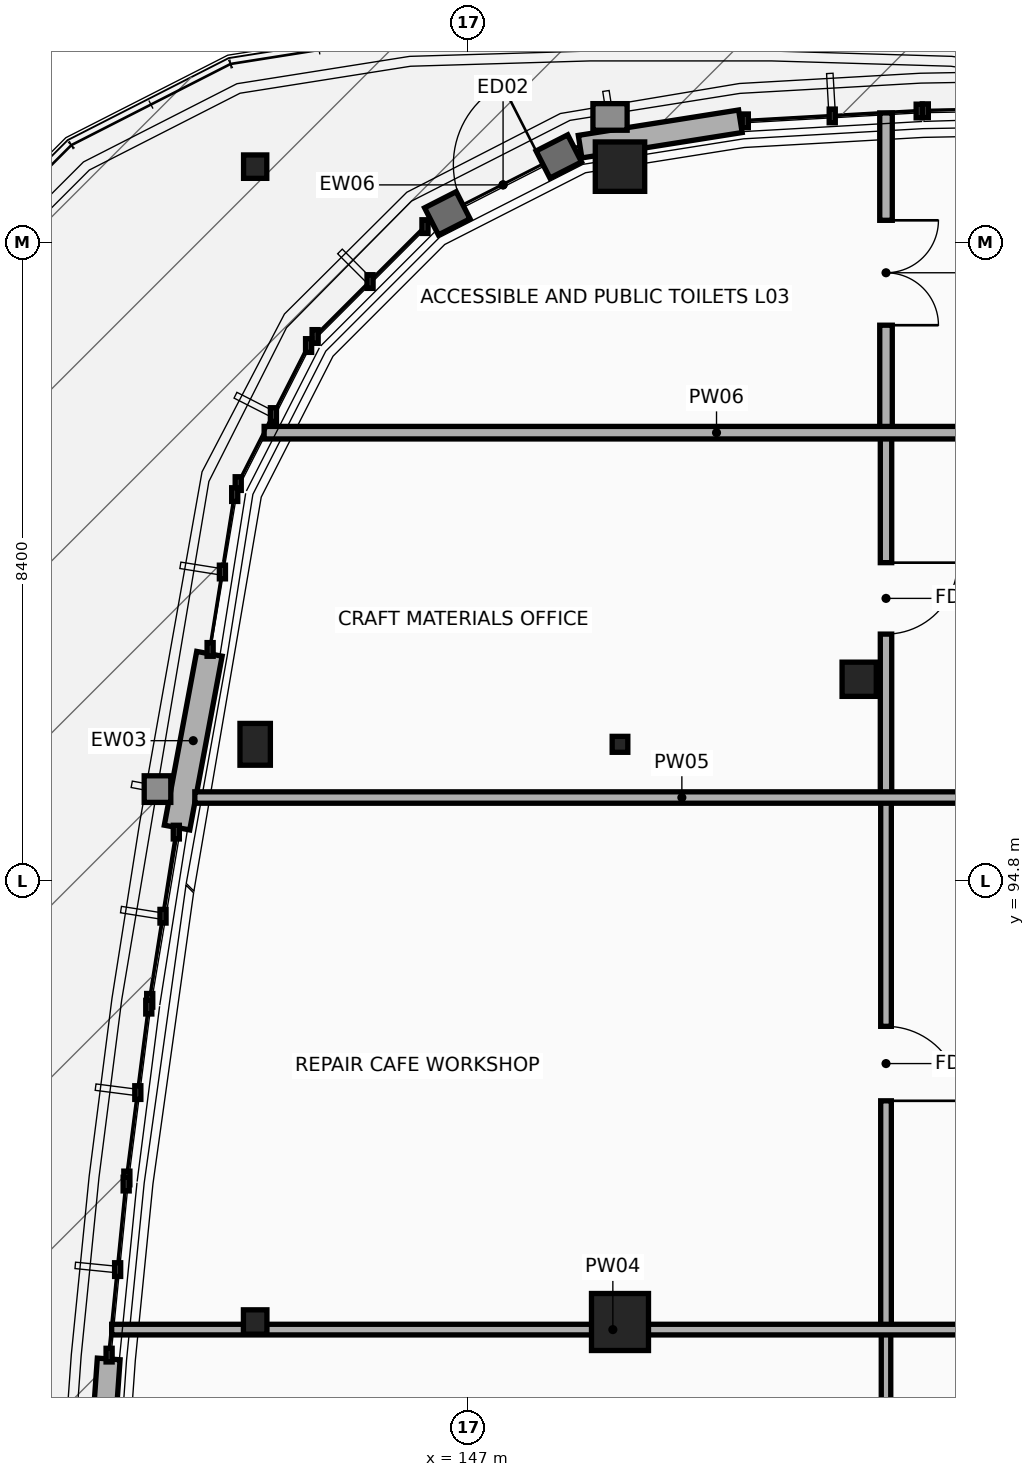
"""IFC4 building model, lengths in metres.
Left out: names, types, materials, properties, quantities, classifications, styles, units other than length and angle.
Written with IfcOpenShell. Run it as: python <this file> out.ifc"""

import sys

from ifc_helpers import new_model, si_unit, direction, frame, frame_2d, origin, origin_2d, place, context, subcontext, project, spatial, rectangle, i_section, extrude, element, fill, save


model = new_model("IFC4")
c1 = context("Model", 3, precision=1e-05, world=origin(), true_north=direction((0.0, 1.0)))
c2 = subcontext(c1, "Body", "Model", "MODEL_VIEW")
j1 = project(units=[si_unit("LENGTHUNIT", "METRE"), si_unit("PLANEANGLEUNIT", "RADIAN")], contexts=[c1])
p1 = place(None, origin())
s1 = spatial("IfcSite", under=j1, at=p1, CompositionType="ELEMENT")
p2 = place(p1, origin())
s2 = spatial("IfcBuilding", under=s1, at=p2, CompositionType="ELEMENT")
p3 = place(p2, frame((0.0, 0.0, 12.6)))
s3 = spatial("IfcBuildingStorey", under=s2, at=p3, CompositionType="ELEMENT", Elevation=12.6)
p4 = place(p3, frame((144.2, 89.0, 0.0), z_axis=(0.0, 0.0, 1.0), x_axis=(1.0, 0.0, 0.0)))
e1 = element("IfcColumn", 1, at=p4, inside=s3, PredefinedType="COLUMN", context=c2, shape_type="SweptSolid", body=[
    extrude(i_section(OverallWidth=0.309, OverallDepth=0.321, WebThickness=0.014, FlangeThickness=0.022, at=origin_2d()), origin(), (0.0, 0.0, 1.0), 3.6),
])
p5 = place(p3, frame((144.2, 96.6, 0.0), z_axis=(0.0, 0.0, 1.0), x_axis=(1.0, 0.0, 0.0)))
e2 = element("IfcColumn", 2, at=p5, inside=s3, PredefinedType="COLUMN", context=c2, shape_type="SweptSolid", body=[
    extrude(rectangle(XDim=0.4, YDim=0.55, at=origin_2d()), origin(), (0.0, 0.0, 1.0), 3.6),
])
p6 = place(p3, frame((144.2, 104.2, 0.0), z_axis=(0.0, 0.0, 1.0), x_axis=(1.0, 0.0, 0.0)))
e3 = element("IfcColumn", 3, at=p6, inside=s3, PredefinedType="COLUMN", context=c2, shape_type="SweptSolid", body=[
    extrude(i_section(OverallWidth=0.305, OverallDepth=0.308, WebThickness=0.01, FlangeThickness=0.015, at=origin_2d()), origin(), (0.0, 0.0, 1.0), 3.6),
])
p7 = place(p3, frame((149.0, 89.0, 0.0), z_axis=(0.0, 0.0, 1.0), x_axis=(1.0, 0.0, 0.0)))
e4 = element("IfcColumn", 4, at=p7, inside=s3, PredefinedType="COLUMN", context=c2, shape_type="SweptSolid", body=[
    extrude(rectangle(XDim=0.75, YDim=0.75, at=origin_2d()), origin(), (0.0, 0.0, 1.0), 3.6),
])
p8 = place(p3, frame((149.0, 96.6, 0.0), z_axis=(0.0, 0.0, 1.0), x_axis=(1.0, 0.0, 0.0)))
e5 = element("IfcColumn", 5, at=p8, inside=s3, PredefinedType="COLUMN", context=c2, shape_type="SweptSolid", body=[
    extrude(i_section(OverallWidth=0.206, OverallDepth=0.21, WebThickness=0.01, FlangeThickness=0.014, at=origin_2d()), origin(), (0.0, 0.0, 1.0), 3.6),
])
p9 = place(p3, frame((149.0, 104.2, 0.0), z_axis=(0.0, 0.0, 1.0), x_axis=(1.0, 0.0, 0.0)))
e6 = element("IfcColumn", 6, at=p9, inside=s3, PredefinedType="COLUMN", context=c2, shape_type="SweptSolid", body=[
    extrude(rectangle(XDim=0.65, YDim=0.65, at=origin_2d()), origin(), (0.0, 0.0, 1.0), 3.6),
])
p10 = place(p3, frame((152.147, 97.456, 0.0), z_axis=(0.0, 0.0, 1.0), x_axis=(1.0, 0.0, 0.0)))
e7 = element("IfcColumn", 7, at=p10, inside=s3, PredefinedType="COLUMN", context=c2, shape_type="SweptSolid", body=[
    extrude(rectangle(XDim=0.45, YDim=0.45, at=origin_2d()), origin(), (0.0, 0.0, 1.0), 3.6),
])
p11 = place(p3, frame((148.475, 104.463, 0.0), z_axis=(0.0, 0.0, 1.0), x_axis=(0.987672873908, 0.156532086638, 0.0)))
e8 = element("IfcWall", 8, at=p11, inside=s3, PredefinedType="STANDARD", context=c2, shape_type="SweptSolid", body=[
    extrude(rectangle(XDim=2.135, YDim=0.3, at=frame_2d((1.068, 0.0))), origin(), (0.0, 0.0, 1.0), 3.337),
])
p12 = place(p3, frame((146.52, 103.48, 0.0), z_axis=(0.0, 0.0, 1.0), x_axis=(0.89091164553, 0.454176661509, 0.0)))
e9 = element("IfcWall", 9, at=p12, inside=s3, PredefinedType="STANDARD", context=c2, shape_type="SweptSolid", body=[
    extrude(rectangle(XDim=2.114, YDim=0.4, at=frame_2d((1.057, 0.0))), origin(), (0.0, 0.0, 1.0), 2.97),
])
p13 = place(p12, frame((0.467, 0.0, 0.0)))
e10 = element("IfcOpeningElement", 10, at=p13, cuts=e9, PredefinedType="OPENING", context=c2, shape_type="SweptSolid", body=[
    extrude(rectangle(XDim=1.18, YDim=2.24, at=frame_2d((0.59, 1.12))), frame((0.0, 0.21, 0.0), z_axis=(0.0, -1.0, 0.0), x_axis=(1.0, 0.0, 0.0)), (0.0, 0.0, 1.0), 0.42),
])
p14 = place(p3, frame((143.172, 95.505, 0.0), z_axis=(0.0, 0.0, 1.0), x_axis=(0.183096702171, 0.983094907755, 0.0)))
e11 = element("IfcWall", 11, at=p14, inside=s3, PredefinedType="STANDARD", context=c2, shape_type="SweptSolid", body=[
    extrude(rectangle(XDim=2.325, YDim=0.34, at=frame_2d((1.163, 0.0))), origin(), (0.0, 0.0, 1.0), 3.337),
])
p15 = place(p3, frame((142.109, 86.194, 0.0), z_axis=(0.0, 0.0, 1.0), x_axis=(0.070545752689, 0.997508544714, 0.0)))
e12 = element("IfcWall", 12, at=p15, inside=s3, PredefinedType="STANDARD", context=c2, shape_type="SweptSolid", body=[
    extrude(rectangle(XDim=2.326, YDim=0.3, at=frame_2d((1.163, 0.0))), origin(), (0.0, 0.0, 1.0), 3.337),
])
p16 = place(p15, frame((0.688, 0.0, 0.9)))
e13 = element("IfcOpeningElement", 13, at=p16, cuts=e12, PredefinedType="OPENING", context=c2, shape_type="SweptSolid", body=[
    extrude(rectangle(XDim=0.95, YDim=1.5, at=frame_2d((0.475, 0.75))), frame((0.0, 0.16, 0.0), z_axis=(0.0, -1.0, 0.0), x_axis=(1.0, 0.0, 0.0)), (0.0, 0.0, 1.0), 0.32),
])
p17 = place(p3, frame((152.5, 88.9, 0.0), z_axis=(0.0, 0.0, 1.0), x_axis=(0.0, -1.0, 0.0)))
e14 = element("IfcWall", 14, at=p17, inside=s3, PredefinedType="PARTITIONING", context=c2, shape_type="SweptSolid", body=[
    extrude(rectangle(XDim=9.8, YDim=0.125, at=frame_2d((4.9, 0.0))), origin(), (0.0, 0.0, 1.0), 2.795),
])
p18 = place(p17, frame((4.02, 0.0, 0.0)))
e15 = element("IfcOpeningElement", 15, at=p18, cuts=e14, PredefinedType="OPENING", context=c2, shape_type="SweptSolid", body=[
    extrude(rectangle(XDim=1.76, YDim=2.52, at=frame_2d((0.88, 1.26))), frame((0.0, 0.073, 0.0), z_axis=(0.0, -1.0, 0.0), x_axis=(1.0, 0.0, 0.0)), (0.0, 0.0, 1.0), 0.145),
])
p19 = place(p3, frame((152.5, 95.9, 0.0), z_axis=(0.0, 0.0, 1.0), x_axis=(0.0, -1.0, 0.0)))
e16 = element("IfcWall", 16, at=p19, inside=s3, PredefinedType="PARTITIONING", context=c2, shape_type="SweptSolid", body=[
    extrude(rectangle(XDim=7.0, YDim=0.14, at=frame_2d((3.5, 0.0))), origin(), (0.0, 0.0, 1.0), 2.795),
])
p20 = place(p19, frame((3.01, 0.0, 0.0)))
e17 = element("IfcOpeningElement", 17, at=p20, cuts=e16, PredefinedType="OPENING", context=c2, shape_type="SweptSolid", body=[
    extrude(rectangle(XDim=0.98, YDim=2.12, at=frame_2d((0.49, 1.06))), frame((0.0, 0.08, 0.0), z_axis=(0.0, -1.0, 0.0), x_axis=(1.0, 0.0, 0.0)), (0.0, 0.0, 1.0), 0.16),
])
p21 = place(p3, frame((152.5, 100.7, 0.0), z_axis=(0.0, 0.0, 1.0), x_axis=(0.0, -1.0, 0.0)))
e18 = element("IfcWall", 18, at=p21, inside=s3, PredefinedType="PARTITIONING", context=c2, shape_type="SweptSolid", body=[
    extrude(rectangle(XDim=4.8, YDim=0.15, at=frame_2d((2.4, 0.0))), origin(), (0.0, 0.0, 1.0), 2.733),
])
p22 = place(p21, frame((1.71, 0.0, 0.0)))
e19 = element("IfcOpeningElement", 19, at=p22, cuts=e18, PredefinedType="OPENING", context=c2, shape_type="SweptSolid", body=[
    extrude(rectangle(XDim=0.94, YDim=2.1, at=frame_2d((0.47, 1.05))), frame((0.0, 0.085, 0.0), z_axis=(0.0, -1.0, 0.0), x_axis=(1.0, 0.0, 0.0)), (0.0, 0.0, 1.0), 0.17),
])
p23 = place(p3, frame((152.5, 104.907, 0.0), z_axis=(0.0, 0.0, 1.0), x_axis=(0.0, -1.0, 0.0)))
e20 = element("IfcWall", 20, at=p23, inside=s3, PredefinedType="PARTITIONING", context=c2, shape_type="SweptSolid", body=[
    extrude(rectangle(XDim=4.207, YDim=0.165, at=frame_2d((2.104, 0.0))), origin(), (0.0, 0.0, 1.0), 2.925),
])
p24 = place(p23, frame((1.413, 0.0, 0.0)))
e21 = element("IfcOpeningElement", 21, at=p24, cuts=e20, PredefinedType="OPENING", context=c2, shape_type="SweptSolid", body=[
    extrude(rectangle(XDim=1.38, YDim=2.2, at=frame_2d((0.69, 1.1))), frame((0.0, 0.093, 0.0), z_axis=(0.0, -1.0, 0.0), x_axis=(1.0, 0.0, 0.0)), (0.0, 0.0, 1.0), 0.185),
])
p25 = place(p3, frame((142.312, 88.9, 0.0), z_axis=(0.0, 0.0, 1.0), x_axis=(1.0, 0.0, 0.0)))
e22 = element("IfcWall", 22, at=p25, inside=s3, PredefinedType="PARTITIONING", context=c2, shape_type="SweptSolid", body=[
    extrude(rectangle(XDim=13.188, YDim=0.14, at=frame_2d((6.594, 0.0))), origin(), (0.0, 0.0, 1.0), 2.733),
])
p26 = place(p3, frame((143.406, 95.9, 0.0), z_axis=(0.0, 0.0, 1.0), x_axis=(1.0, 0.0, 0.0)))
e23 = element("IfcWall", 23, at=p26, inside=s3, PredefinedType="PARTITIONING", context=c2, shape_type="SweptSolid", body=[
    extrude(rectangle(XDim=12.816, YDim=0.15, at=frame_2d((6.408, 0.0))), origin(), (0.0, 0.0, 1.0), 2.733),
])
p27 = place(p3, frame((144.318, 100.7, 0.0), z_axis=(0.0, 0.0, 1.0), x_axis=(1.0, 0.0, 0.0)))
e24 = element("IfcWall", 24, at=p27, inside=s3, PredefinedType="PARTITIONING", context=c2, shape_type="SweptSolid", body=[
    extrude(rectangle(XDim=11.904, YDim=0.165, at=frame_2d((5.952, 0.0))), origin(), (0.0, 0.0, 1.0), 2.642),
])
p28 = place(p13, origin())
e25 = element("IfcDoor", 25, at=p28, inside=s3, OperationType="SINGLE_SWING_RIGHT", PredefinedType="DOOR", context=c2, shape_type="SweptSolid", body=[
    extrude(rectangle(XDim=1.18, YDim=2.24, at=frame_2d((0.59, 1.12))), frame((0.0, 0.025, 0.0), z_axis=(0.0, -1.0, 0.0), x_axis=(1.0, 0.0, 0.0)), (0.0, 0.0, 1.0), 0.05),
])
fill(e10, e25)
p29 = place(p20, origin())
e26 = element("IfcDoor", 26, at=p29, inside=s3, OperationType="SINGLE_SWING_RIGHT", PredefinedType="DOOR", context=c2, shape_type="SweptSolid", body=[
    extrude(rectangle(XDim=0.98, YDim=2.12, at=frame_2d((0.49, 1.06))), frame((0.0, 0.025, 0.0), z_axis=(0.0, -1.0, 0.0), x_axis=(1.0, 0.0, 0.0)), (0.0, 0.0, 1.0), 0.05),
])
fill(e17, e26)
p30 = place(p22, origin())
e27 = element("IfcDoor", 27, at=p30, inside=s3, OperationType="SINGLE_SWING_LEFT", PredefinedType="DOOR", context=c2, shape_type="SweptSolid", body=[
    extrude(rectangle(XDim=0.94, YDim=2.1, at=frame_2d((0.47, 1.05))), frame((0.0, 0.025, 0.0), z_axis=(0.0, -1.0, 0.0), x_axis=(1.0, 0.0, 0.0)), (0.0, 0.0, 1.0), 0.05),
])
fill(e19, e27)
p31 = place(p24, origin())
e28 = element("IfcDoor", 28, at=p31, inside=s3, OperationType="DOUBLE_DOOR_SINGLE_SWING", PredefinedType="DOOR", context=c2, shape_type="SweptSolid", body=[
    extrude(rectangle(XDim=1.38, YDim=2.2, at=frame_2d((0.69, 1.1))), frame((0.0, 0.025, 0.0), z_axis=(0.0, -1.0, 0.0), x_axis=(1.0, 0.0, 0.0)), (0.0, 0.0, 1.0), 0.05),
])
fill(e21, e28)
save(model, sys.argv[1])
